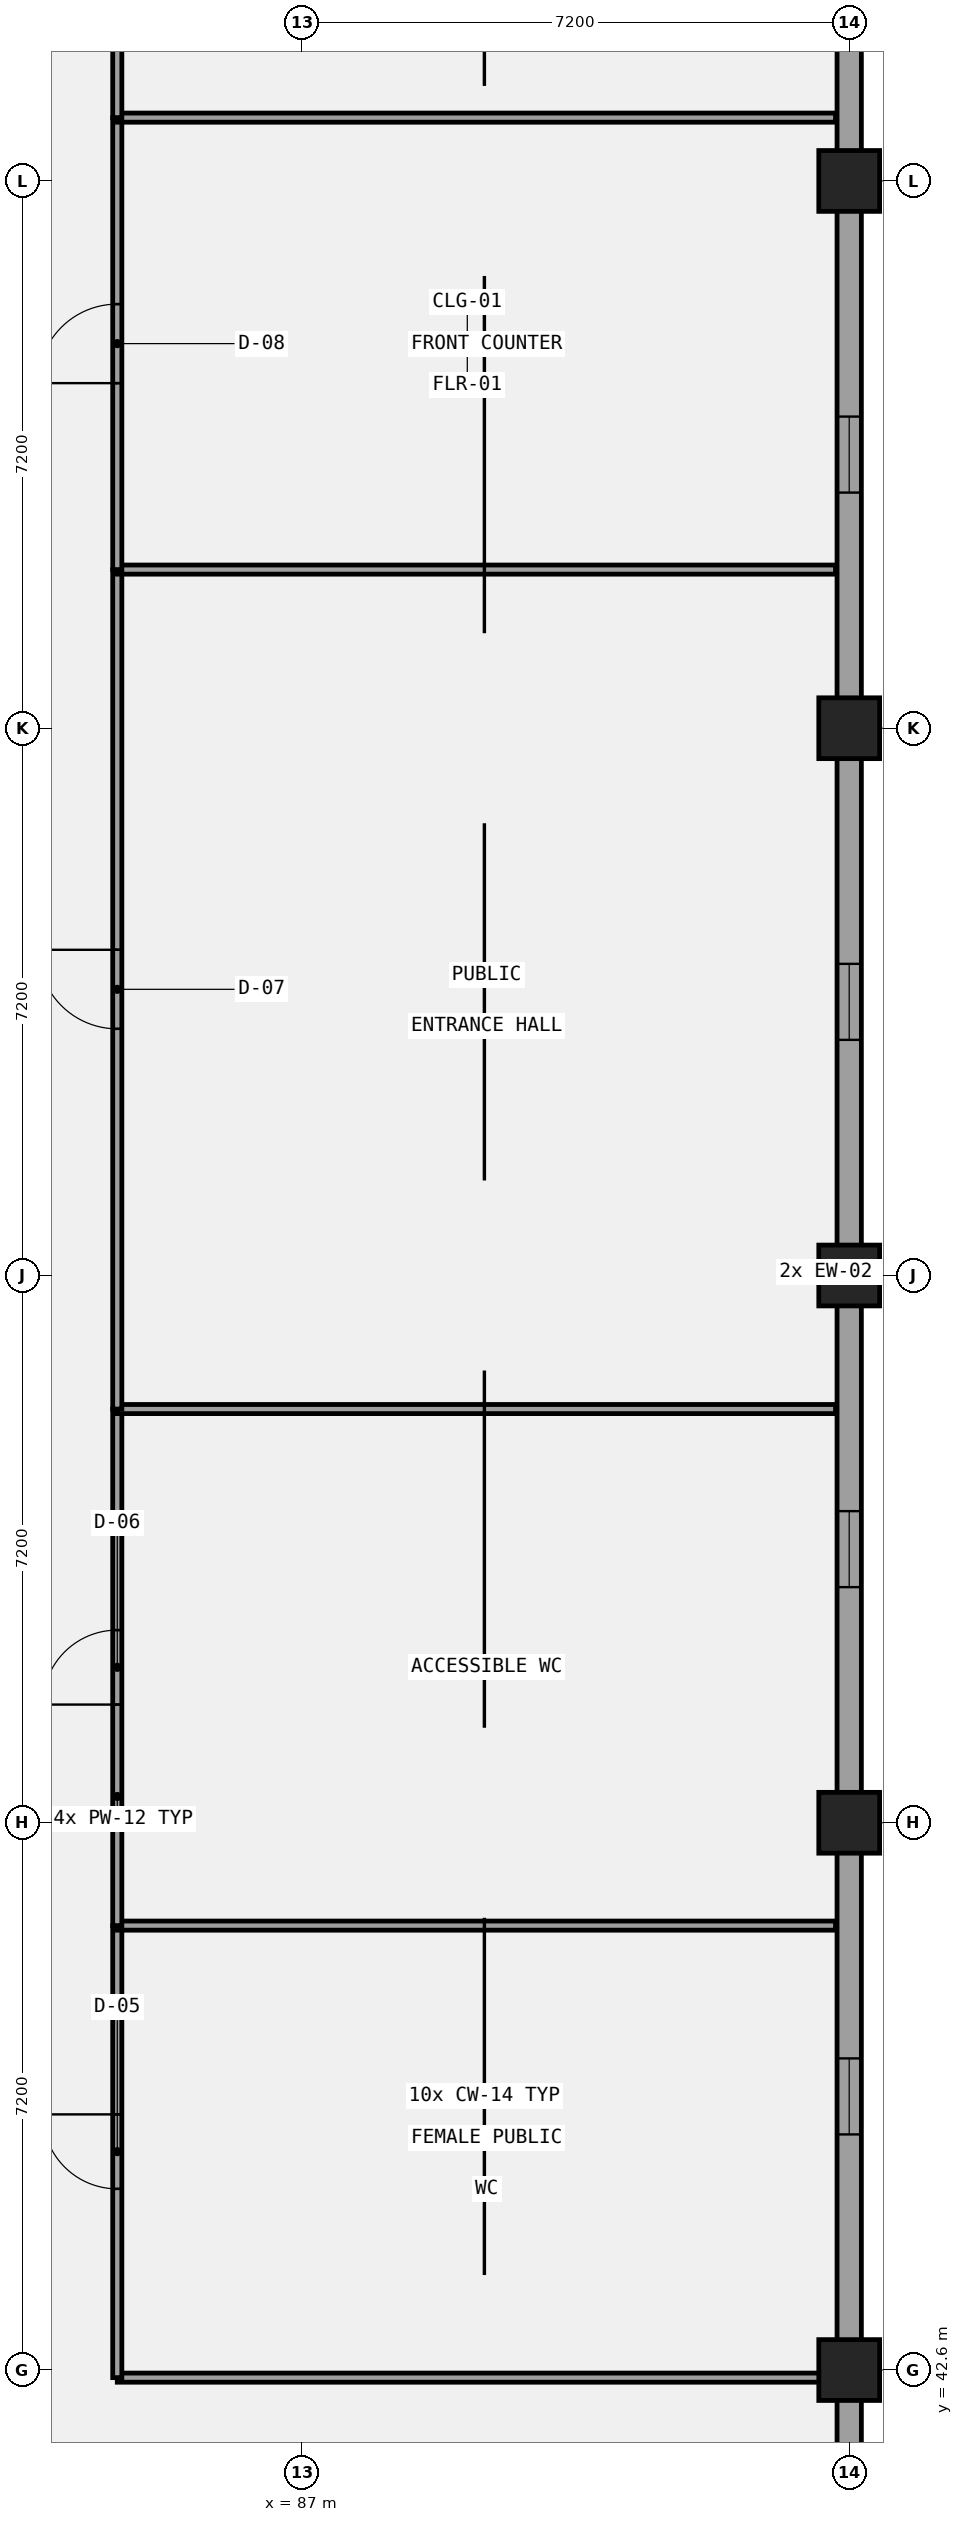
"""IFC4 building model, lengths in metres.
Left out: names, types, materials, properties, quantities, classifications, styles, units other than length and angle.
Written with IfcOpenShell. Run it as: python <this file> out.ifc"""

import sys

from ifc_helpers import new_model, si_unit, direction, frame, frame_2d, origin, origin_2d, place, context, subcontext, project, spatial, rectangle, circle, extrude, element, fill, save


model = new_model("IFC4")
c1 = context("Model", 3, precision=1e-05, world=origin(), true_north=direction((0.0, 1.0)))
c2 = subcontext(c1, "Body", "Model", "MODEL_VIEW")
j1 = project(units=[si_unit("LENGTHUNIT", "METRE"), si_unit("PLANEANGLEUNIT", "RADIAN")], contexts=[c1])
p1 = place(None, origin())
s1 = spatial("IfcSite", under=j1, at=p1, CompositionType="ELEMENT")
p2 = place(p1, origin())
s2 = spatial("IfcBuilding", under=s1, at=p2, CompositionType="ELEMENT")
p3 = place(p2, origin())
s3 = spatial("IfcBuildingStorey", under=s2, at=p3, CompositionType="ELEMENT", Elevation=0.0)
for number, where, z_axis, x_axis in (
    (1, (94.2, 42.6, -0.32), (0.0, 0.0, 1.0), (1.0, 0.0, 0.0)),
    (2, (94.2, 49.8, -0.32), (0.0, 0.0, 1.0), (1.0, 0.0, 0.0)),
    (3, (94.2, 57.0, -0.32), (0.0, 0.0, 1.0), (1.0, 0.0, 0.0)),
    (4, (94.2, 64.2, -0.32), (0.0, 0.0, 1.0), (1.0, 0.0, 0.0)),
    (5, (94.2, 71.4, -0.32), (0.0, 0.0, 1.0), (1.0, 0.0, 0.0)),
):
    element("IfcColumn", number, at=place(p3, frame(where, z_axis=z_axis, x_axis=x_axis)), inside=s3, PredefinedType="COLUMN", context=c2, shape_type="SweptSolid", body=[
        extrude(circle(Radius=0.4, at=origin_2d()), origin(), (0.0, 0.0, 1.0), 5.72),
    ])
p4 = place(p3, frame((94.2, 35.65, 0.0), z_axis=(0.0, 0.0, 1.0), x_axis=(0.0, 1.0, 0.0)))
e6 = element("IfcWall", 6, at=p4, inside=s3, PredefinedType="SOLIDWALL", context=c2, shape_type="SweptSolid", body=[
    extrude(rectangle(XDim=42.79, YDim=0.32, at=frame_2d((21.395, 0.0))), origin(), (0.0, 0.0, 1.0), 4.12),
])
p5 = place(p4, frame((2.975, 0.0, 1.0)))
e7 = element("IfcOpeningElement", 7, at=p5, cuts=e6, PredefinedType="OPENING", context=c2, shape_type="SweptSolid", body=[
    extrude(rectangle(XDim=1.0, YDim=1.65, at=frame_2d((0.5, 0.825))), frame((0.0, 0.17, 0.0), z_axis=(0.0, -1.0, 0.0), x_axis=(1.0, 0.0, 0.0)), (0.0, 0.0, 1.0), 0.34),
])
p6 = place(p4, frame((10.05, 0.0, 1.0)))
e8 = element("IfcOpeningElement", 8, at=p6, cuts=e6, PredefinedType="OPENING", context=c2, shape_type="SweptSolid", body=[
    extrude(rectangle(XDim=1.0, YDim=1.65, at=frame_2d((0.5, 0.825))), frame((0.0, 0.17, 0.0), z_axis=(0.0, -1.0, 0.0), x_axis=(1.0, 0.0, 0.0)), (0.0, 0.0, 1.0), 0.34),
])
p7 = place(p4, frame((17.25, 0.0, 1.0)))
e9 = element("IfcOpeningElement", 9, at=p7, cuts=e6, PredefinedType="OPENING", context=c2, shape_type="SweptSolid", body=[
    extrude(rectangle(XDim=1.0, YDim=1.65, at=frame_2d((0.5, 0.825))), frame((0.0, 0.17, 0.0), z_axis=(0.0, -1.0, 0.0), x_axis=(1.0, 0.0, 0.0)), (0.0, 0.0, 1.0), 0.34),
])
p8 = place(p4, frame((24.45, 0.0, 1.0)))
e10 = element("IfcOpeningElement", 10, at=p8, cuts=e6, PredefinedType="OPENING", context=c2, shape_type="SweptSolid", body=[
    extrude(rectangle(XDim=1.0, YDim=1.65, at=frame_2d((0.5, 0.825))), frame((0.0, 0.17, 0.0), z_axis=(0.0, -1.0, 0.0), x_axis=(1.0, 0.0, 0.0)), (0.0, 0.0, 1.0), 0.34),
])
p9 = place(p4, frame((31.65, 0.0, 1.0)))
e11 = element("IfcOpeningElement", 11, at=p9, cuts=e6, PredefinedType="OPENING", context=c2, shape_type="SweptSolid", body=[
    extrude(rectangle(XDim=1.0, YDim=1.65, at=frame_2d((0.5, 0.825))), frame((0.0, 0.17, 0.0), z_axis=(0.0, -1.0, 0.0), x_axis=(1.0, 0.0, 0.0)), (0.0, 0.0, 1.0), 0.34),
])
p10 = place(p4, frame((38.77, 0.0, 1.0)))
e12 = element("IfcOpeningElement", 12, at=p10, cuts=e6, PredefinedType="OPENING", context=c2, shape_type="SweptSolid", body=[
    extrude(rectangle(XDim=1.0, YDim=1.65, at=frame_2d((0.5, 0.825))), frame((0.0, 0.17, 0.0), z_axis=(0.0, -1.0, 0.0), x_axis=(1.0, 0.0, 0.0)), (0.0, 0.0, 1.0), 0.34),
])
p11 = place(p3, frame((84.57, 42.5, 0.0), z_axis=(0.0, 0.0, 1.0), x_axis=(1.0, 0.0, 0.0)))
e13 = element("IfcWall", 13, at=p11, inside=s3, PredefinedType="PARTITIONING", context=c2, shape_type="SweptSolid", body=[
    extrude(rectangle(XDim=9.45, YDim=0.12, at=frame_2d((4.725, 0.0))), origin(), (0.0, 0.0, 1.0), 5.12),
])
p12 = place(p3, frame((84.57, 42.5, 0.0), z_axis=(0.0, 0.0, 1.0), x_axis=(0.0, 1.0, 0.0)))
e14 = element("IfcWall", 14, at=p12, inside=s3, PredefinedType="PARTITIONING", context=c2, shape_type="SweptSolid", body=[
    extrude(rectangle(XDim=5.947, YDim=0.12, at=frame_2d((2.974, 0.0))), origin(), (0.0, 0.0, 1.0), 5.12),
])
p13 = place(p12, frame((2.483, 0.0, 0.0)))
e15 = element("IfcOpeningElement", 15, at=p13, cuts=e14, PredefinedType="OPENING", context=c2, shape_type="SweptSolid", body=[
    extrude(rectangle(XDim=0.98, YDim=2.22, at=frame_2d((0.49, 1.11))), frame((0.0, 0.07, 0.0), z_axis=(0.0, -1.0, 0.0), x_axis=(1.0, 0.0, 0.0)), (0.0, 0.0, 1.0), 0.14),
])
p14 = place(p3, frame((84.57, 48.447, 0.0), z_axis=(0.0, 0.0, 1.0), x_axis=(1.0, 0.0, 0.0)))
e16 = element("IfcWall", 16, at=p14, inside=s3, PredefinedType="PARTITIONING", context=c2, shape_type="SweptSolid", body=[
    extrude(rectangle(XDim=9.45, YDim=0.12, at=frame_2d((4.725, 0.0))), origin(), (0.0, 0.0, 1.0), 5.12),
])
p15 = place(p3, frame((84.57, 48.447, 0.0), z_axis=(0.0, 0.0, 1.0), x_axis=(0.0, 1.0, 0.0)))
e17 = element("IfcWall", 17, at=p15, inside=s3, PredefinedType="PARTITIONING", context=c2, shape_type="SweptSolid", body=[
    extrude(rectangle(XDim=6.796, YDim=0.12, at=frame_2d((3.398, 0.0))), origin(), (0.0, 0.0, 1.0), 5.12),
])
p16 = place(p15, frame((2.908, 0.0, 0.0)))
e18 = element("IfcOpeningElement", 18, at=p16, cuts=e17, PredefinedType="OPENING", context=c2, shape_type="SweptSolid", body=[
    extrude(rectangle(XDim=0.98, YDim=2.35, at=frame_2d((0.49, 1.175))), frame((0.0, 0.07, 0.0), z_axis=(0.0, -1.0, 0.0), x_axis=(1.0, 0.0, 0.0)), (0.0, 0.0, 1.0), 0.14),
])
p17 = place(p3, frame((84.57, 55.243, 0.0), z_axis=(0.0, 0.0, 1.0), x_axis=(1.0, 0.0, 0.0)))
e19 = element("IfcWall", 19, at=p17, inside=s3, PredefinedType="PARTITIONING", context=c2, shape_type="SweptSolid", body=[
    extrude(rectangle(XDim=9.45, YDim=0.12, at=frame_2d((4.725, 0.0))), origin(), (0.0, 0.0, 1.0), 5.12),
])
p18 = place(p3, frame((84.57, 55.243, 0.0), z_axis=(0.0, 0.0, 1.0), x_axis=(0.0, 1.0, 0.0)))
e20 = element("IfcWall", 20, at=p18, inside=s3, PredefinedType="PARTITIONING", context=c2, shape_type="SweptSolid", body=[
    extrude(rectangle(XDim=11.044, YDim=0.12, at=frame_2d((5.522, 0.0))), origin(), (0.0, 0.0, 1.0), 5.12),
])
p19 = place(p18, frame((5.002, 0.0, 0.0)))
e21 = element("IfcOpeningElement", 21, at=p19, cuts=e20, PredefinedType="OPENING", context=c2, shape_type="SweptSolid", body=[
    extrude(rectangle(XDim=1.04, YDim=2.1, at=frame_2d((0.52, 1.05))), frame((0.0, 0.07, 0.0), z_axis=(0.0, -1.0, 0.0), x_axis=(1.0, 0.0, 0.0)), (0.0, 0.0, 1.0), 0.14),
])
p20 = place(p3, frame((84.57, 66.287, 0.0), z_axis=(0.0, 0.0, 1.0), x_axis=(1.0, 0.0, 0.0)))
e22 = element("IfcWall", 22, at=p20, inside=s3, PredefinedType="PARTITIONING", context=c2, shape_type="SweptSolid", body=[
    extrude(rectangle(XDim=9.45, YDim=0.12, at=frame_2d((4.725, 0.0))), origin(), (0.0, 0.0, 1.0), 5.12),
])
p21 = place(p3, frame((84.57, 66.287, 0.0), z_axis=(0.0, 0.0, 1.0), x_axis=(0.0, 1.0, 0.0)))
e23 = element("IfcWall", 23, at=p21, inside=s3, PredefinedType="PARTITIONING", context=c2, shape_type="SweptSolid", body=[
    extrude(rectangle(XDim=5.946, YDim=0.12, at=frame_2d((2.973, 0.0))), origin(), (0.0, 0.0, 1.0), 5.12),
])
p22 = place(p21, frame((2.453, 0.0, 0.0)))
e24 = element("IfcOpeningElement", 24, at=p22, cuts=e23, PredefinedType="OPENING", context=c2, shape_type="SweptSolid", body=[
    extrude(rectangle(XDim=1.04, YDim=2.22, at=frame_2d((0.52, 1.11))), frame((0.0, 0.07, 0.0), z_axis=(0.0, -1.0, 0.0), x_axis=(1.0, 0.0, 0.0)), (0.0, 0.0, 1.0), 0.14),
])
p23 = place(p3, frame((84.57, 72.233, 0.0), z_axis=(0.0, 0.0, 1.0), x_axis=(1.0, 0.0, 0.0)))
e25 = element("IfcWall", 25, at=p23, inside=s3, PredefinedType="PARTITIONING", context=c2, shape_type="SweptSolid", body=[
    extrude(rectangle(XDim=9.45, YDim=0.12, at=frame_2d((4.725, 0.0))), origin(), (0.0, 0.0, 1.0), 5.12),
])
p24 = place(p3, frame((84.57, 72.233, 0.0), z_axis=(0.0, 0.0, 1.0), x_axis=(0.0, 1.0, 0.0)))
e26 = element("IfcWall", 26, at=p24, inside=s3, PredefinedType="PARTITIONING", context=c2, shape_type="SweptSolid", body=[
    extrude(rectangle(XDim=5.947, YDim=0.12, at=frame_2d((2.974, 0.0))), origin(), (0.0, 0.0, 1.0), 5.12),
])
p25 = place(p24, frame((2.454, 0.0, 0.0)))
e27 = element("IfcOpeningElement", 27, at=p25, cuts=e26, PredefinedType="OPENING", context=c2, shape_type="SweptSolid", body=[
    extrude(rectangle(XDim=1.04, YDim=2.35, at=frame_2d((0.52, 1.175))), frame((0.0, 0.07, 0.0), z_axis=(0.0, -1.0, 0.0), x_axis=(1.0, 0.0, 0.0)), (0.0, 0.0, 1.0), 0.14),
])
p26 = place(p6, origin())
e28 = element("IfcWindow", 28, at=p26, inside=s3, PartitioningType="SINGLE_PANEL", PredefinedType="WINDOW", context=c2, shape_type="SweptSolid", body=[
    extrude(rectangle(XDim=1.0, YDim=1.65, at=frame_2d((0.5, 0.825))), frame((0.0, 0.03, 0.0), z_axis=(0.0, -1.0, 0.0), x_axis=(1.0, 0.0, 0.0)), (0.0, 0.0, 1.0), 0.06),
])
fill(e8, e28)
p27 = place(p7, origin())
e29 = element("IfcWindow", 29, at=p27, inside=s3, PartitioningType="SINGLE_PANEL", PredefinedType="WINDOW", context=c2, shape_type="SweptSolid", body=[
    extrude(rectangle(XDim=1.0, YDim=1.65, at=frame_2d((0.5, 0.825))), frame((0.0, 0.03, 0.0), z_axis=(0.0, -1.0, 0.0), x_axis=(1.0, 0.0, 0.0)), (0.0, 0.0, 1.0), 0.06),
])
fill(e9, e29)
p28 = place(p8, origin())
e30 = element("IfcWindow", 30, at=p28, inside=s3, PartitioningType="SINGLE_PANEL", PredefinedType="WINDOW", context=c2, shape_type="SweptSolid", body=[
    extrude(rectangle(XDim=1.0, YDim=1.65, at=frame_2d((0.5, 0.825))), frame((0.0, 0.03, 0.0), z_axis=(0.0, -1.0, 0.0), x_axis=(1.0, 0.0, 0.0)), (0.0, 0.0, 1.0), 0.06),
])
fill(e10, e30)
p29 = place(p9, origin())
e31 = element("IfcWindow", 31, at=p29, inside=s3, PartitioningType="SINGLE_PANEL", PredefinedType="WINDOW", context=c2, shape_type="SweptSolid", body=[
    extrude(rectangle(XDim=1.0, YDim=1.65, at=frame_2d((0.5, 0.825))), frame((0.0, 0.03, 0.0), z_axis=(0.0, -1.0, 0.0), x_axis=(1.0, 0.0, 0.0)), (0.0, 0.0, 1.0), 0.06),
])
fill(e11, e31)
p30 = place(p13, origin())
e32 = element("IfcDoor", 32, at=p30, inside=s3, OperationType="SINGLE_SWING_RIGHT", PredefinedType="DOOR", context=c2, shape_type="SweptSolid", body=[
    extrude(rectangle(XDim=0.98, YDim=2.22, at=frame_2d((0.49, 1.11))), frame((0.0, 0.025, 0.0), z_axis=(0.0, -1.0, 0.0), x_axis=(1.0, 0.0, 0.0)), (0.0, 0.0, 1.0), 0.05),
])
fill(e15, e32)
p31 = place(p16, origin())
e33 = element("IfcDoor", 33, at=p31, inside=s3, OperationType="SINGLE_SWING_LEFT", PredefinedType="DOOR", context=c2, shape_type="SweptSolid", body=[
    extrude(rectangle(XDim=0.98, YDim=2.35, at=frame_2d((0.49, 1.175))), frame((0.0, 0.025, 0.0), z_axis=(0.0, -1.0, 0.0), x_axis=(1.0, 0.0, 0.0)), (0.0, 0.0, 1.0), 0.05),
])
fill(e18, e33)
p32 = place(p19, origin())
e34 = element("IfcDoor", 34, at=p32, inside=s3, OperationType="SINGLE_SWING_RIGHT", PredefinedType="DOOR", context=c2, shape_type="SweptSolid", body=[
    extrude(rectangle(XDim=1.04, YDim=2.1, at=frame_2d((0.52, 1.05))), frame((0.0, 0.025, 0.0), z_axis=(0.0, -1.0, 0.0), x_axis=(1.0, 0.0, 0.0)), (0.0, 0.0, 1.0), 0.05),
])
fill(e21, e34)
p33 = place(p22, origin())
e35 = element("IfcDoor", 35, at=p33, inside=s3, OperationType="SINGLE_SWING_LEFT", PredefinedType="DOOR", context=c2, shape_type="SweptSolid", body=[
    extrude(rectangle(XDim=1.04, YDim=2.22, at=frame_2d((0.52, 1.11))), frame((0.0, 0.025, 0.0), z_axis=(0.0, -1.0, 0.0), x_axis=(1.0, 0.0, 0.0)), (0.0, 0.0, 1.0), 0.05),
])
fill(e24, e35)
save(model, sys.argv[1])
